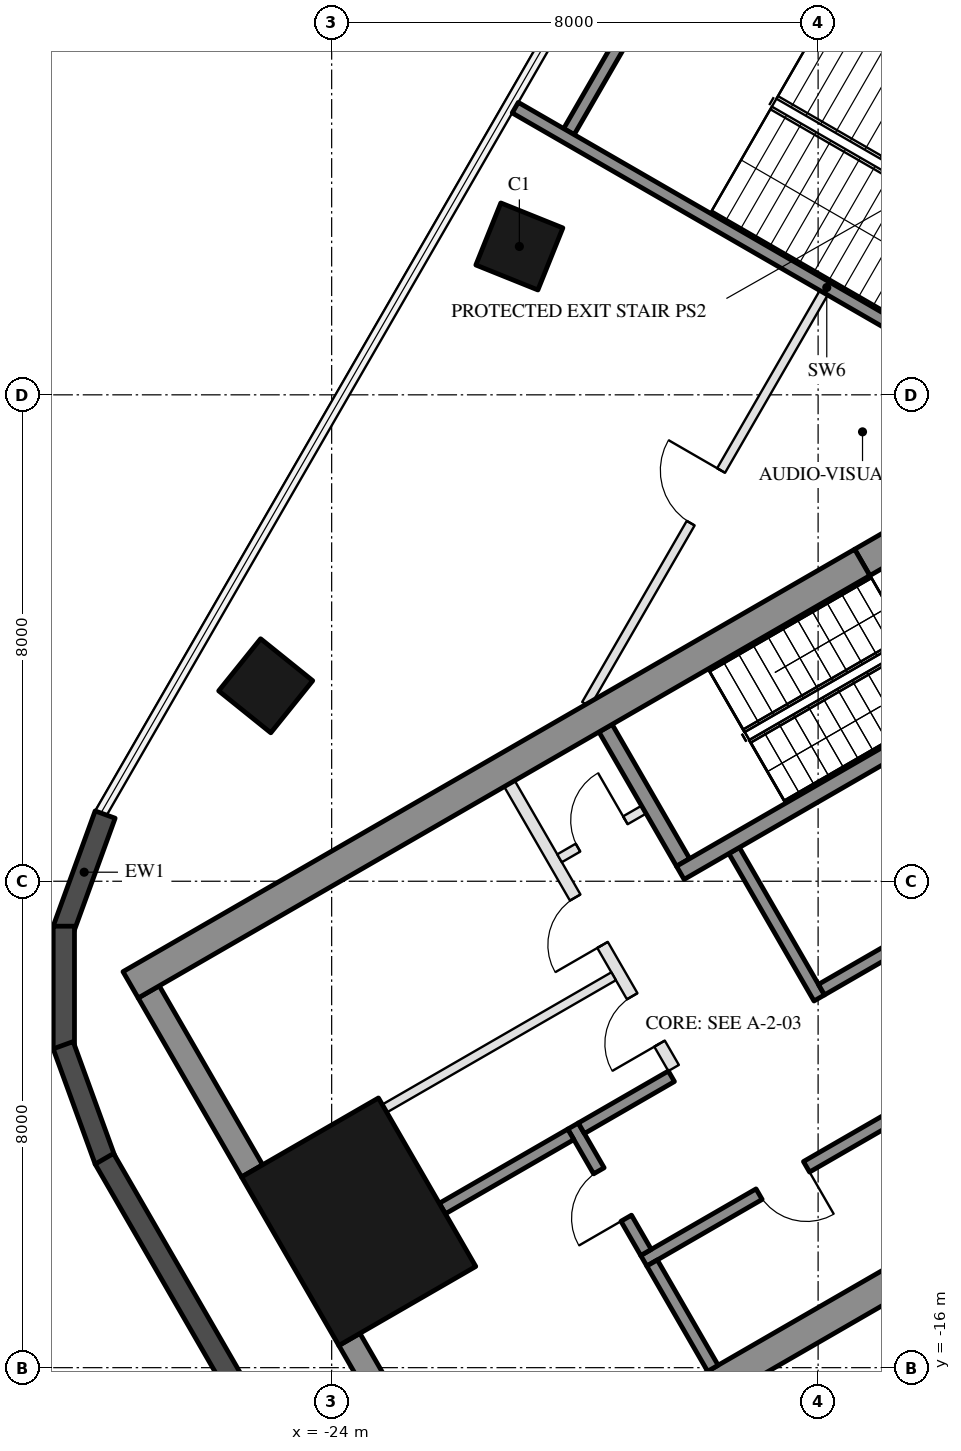
"""IFC4 building model, lengths in metres.
Left out: names, types, materials, properties, quantities, classifications, styles, units other than length and angle.
Written with IfcOpenShell. Run it as: python <this file> out.ifc"""

import sys

from ifc_helpers import new_model, si_unit, direction, frame, frame_2d, origin, origin_2d, place, context, subcontext, project, spatial, rectangle, hollow_rectangle, extrude, boolean, halfspace, element, fill, save


model = new_model("IFC4")
c1 = context("Model", 3, precision=1e-05, world=origin(), true_north=direction((0.0, 1.0)))
c2 = subcontext(c1, "Body", "Model", "MODEL_VIEW")
j1 = project(units=[si_unit("LENGTHUNIT", "METRE"), si_unit("PLANEANGLEUNIT", "RADIAN")], contexts=[c1])
p1 = place(None, origin())
s1 = spatial("IfcSite", under=j1, at=p1, CompositionType="ELEMENT")
p2 = place(p1, origin())
s2 = spatial("IfcBuilding", under=s1, at=p2, CompositionType="ELEMENT")
p3 = place(p2, frame((0.0, 0.0, 15.5)))
s3 = spatial("IfcBuildingStorey", under=s2, at=p3, CompositionType="ELEMENT", Elevation=15.5)
p4 = place(p3, frame((-20.913, 2.44, 0.0), z_axis=(0.087093940596, -0.012342108161, 0.996123645878), x_axis=(-0.498471453495, -0.866283513655, 0.032849414298)))
e1 = element("IfcColumn", 1, at=p4, inside=s3, PredefinedType="COLUMN", context=c2, shape_type="SweptSolid", body=[
    boolean("DIFFERENCE", boolean("DIFFERENCE", extrude(hollow_rectangle(XDim=1.1, YDim=1.1, WallThickness=0.05, at=origin_2d()), origin(), (0.0, 0.0, 1.0), 8.031), halfspace(frame((0.0, 0.0, 0.016), z_axis=(0.0, 0.0, 1.0), x_axis=(1.0, 0.0, 0.0)), True)), halfspace(frame((0.0, 0.0, 8.017), z_axis=(0.0, 0.0, 1.0), x_axis=(1.0, 0.0, 0.0)), False)),
])
p5 = place(p3, frame((-25.085, -4.785, 0.0), z_axis=(0.103342523087, 0.016055270107, 0.994516239799), x_axis=(-0.496544233253, -0.865531278417, 0.06557004274)))
e2 = element("IfcColumn", 2, at=p5, inside=s3, PredefinedType="COLUMN", context=c2, shape_type="SweptSolid", body=[
    boolean("DIFFERENCE", boolean("DIFFERENCE", extrude(hollow_rectangle(XDim=1.1, YDim=1.1, WallThickness=0.05, at=origin_2d()), origin(), (0.0, 0.0, 1.0), 8.044), halfspace(frame((0.0, 0.0, 0.018), z_axis=(0.0, 0.0, 1.0), x_axis=(1.0, 0.0, 0.0)), True)), halfspace(frame((0.0, 0.0, 8.027), z_axis=(0.0, 0.0, 1.0), x_axis=(1.0, 0.0, 0.0)), False)),
])
p6 = place(p3, frame((-23.556, -13.6, 0.0), z_axis=(0.0, 0.0, 1.0), x_axis=(-0.5, 0.866025403784, 0.0)))
e3 = element("IfcColumn", 3, at=p6, inside=s3, PredefinedType="COLUMN", context=c2, shape_type="SweptSolid", body=[
    extrude(hollow_rectangle(XDim=3.2, YDim=2.6, WallThickness=0.08, at=origin_2d()), origin(), (0.0, 0.0, 1.0), 8.0),
])
p7 = place(p3, frame((-27.725, -6.903, 0.0), z_axis=(0.0, 0.0, 1.0), x_axis=(-0.342102542586, -0.939662625816, 0.0)))
e4 = element("IfcWall", 4, at=p7, inside=s3, PredefinedType="SOLIDWALL", context=c2, shape_type="SweptSolid", body=[
    extrude(rectangle(XDim=2.018, YDim=0.35, at=frame_2d((1.009, 0.0))), origin(), (0.0, 0.0, 1.0), 7.7),
])
for number, where, z_axis, x_axis in (
    (5, (-28.405, -8.739, 0.0), (0.0, 0.0, 1.0), (0.0, -1.0, 0.0)),
    (6, (-28.415, -10.697, 0.0), (0.0, 0.0, 1.0), (0.342, -0.94, 0.0)),
):
    element("IfcWall", number, at=place(p3, frame(where, z_axis=z_axis, x_axis=x_axis)), inside=s3, PredefinedType="SOLIDWALL", context=c2, shape_type="SweptSolid", body=[
        extrude(rectangle(XDim=2.017, YDim=0.35, at=frame_2d((1.009, 0.0))), origin(), (0.0, 0.0, 1.0), 7.7),
    ])
p8 = place(p3, frame((-27.738, -12.565, 0.0), z_axis=(0.0, 0.0, 1.0), x_axis=(0.499984178349, -0.866034538226, 0.0)))
e7 = element("IfcWall", 7, at=p8, inside=s3, PredefinedType="SOLIDWALL", context=c2, shape_type="SweptSolid", body=[
    extrude(rectangle(XDim=5.975, YDim=0.35, at=frame_2d((2.988, 0.0))), origin(), (0.0, 0.0, 1.0), 7.7),
])
p9 = place(p3, frame((-8.547, -10.997, 0.0), z_axis=(0.0, 0.0, 1.0), x_axis=(-0.866024264262, -0.500001973705, 0.0)))
e8 = element("IfcWall", 8, at=p9, inside=s3, PredefinedType="SHEAR", context=c2, shape_type="SweptSolid", body=[
    extrude(rectangle(XDim=15.6, YDim=0.5, at=frame_2d((7.8, 0.0))), origin(), (0.0, 0.0, 1.0), 7.7),
])
p10 = place(p3, frame((-23.708, -15.536, 0.0), z_axis=(0.0, 0.0, 1.0), x_axis=(0.500008388397, -0.866020560687, 0.0)))
e9 = element("IfcWall", 9, at=p10, inside=s3, PredefinedType="SHEAR", context=c2, shape_type="SweptSolid", body=[
    extrude(rectangle(XDim=3.4, YDim=0.4, at=frame_2d((1.7, 0.0))), origin(), (0.0, 0.0, 1.0), 7.7),
])
p11 = place(p3, frame((-27.009, -9.82, 0.0), z_axis=(0.0, 0.0, 1.0), x_axis=(0.499977295307, -0.866038511948, 0.0)))
e10 = element("IfcWall", 10, at=p11, inside=s3, PredefinedType="SHEAR", context=c2, shape_type="SweptSolid", body=[
    extrude(rectangle(XDim=3.4, YDim=0.4, at=frame_2d((1.7, 0.0))), origin(), (0.0, 0.0, 1.0), 7.7),
])
p12 = place(p3, frame((-19.496, -5.482, 0.0), z_axis=(0.0, 0.0, 1.0), x_axis=(0.499990435942, -0.866030925526, 0.0)))
e11 = element("IfcWall", 11, at=p12, inside=s3, PredefinedType="SHEAR", context=c2, shape_type="SweptSolid", body=[
    extrude(rectangle(XDim=2.55, YDim=0.25, at=frame_2d((1.275, 0.0))), origin(), (0.0, 0.0, 1.0), 7.7),
])
p13 = place(p3, frame((-17.381, -7.495, 0.0), z_axis=(0.0, 0.0, 1.0), x_axis=(0.500011755427, -0.866018616679, 0.0)))
e12 = element("IfcWall", 12, at=p13, inside=s3, PredefinedType="SHEAR", context=c2, shape_type="SweptSolid", body=[
    extrude(rectangle(XDim=2.8, YDim=0.2, at=frame_2d((1.4, 0.0))), origin(), (0.0, 0.0, 1.0), 7.7),
])
p14 = place(p3, frame((-13.52, -8.383, 0.0), z_axis=(0.0, 0.0, 1.0), x_axis=(-0.866034573852, -0.49998411664, 0.0)))
e13 = element("IfcWall", 13, at=p14, inside=s3, PredefinedType="SHEAR", context=c2, shape_type="SweptSolid", body=[
    extrude(rectangle(XDim=2.8, YDim=0.2, at=frame_2d((1.4, 0.0))), origin(), (0.0, 0.0, 1.0), 7.7),
])
p15 = place(p3, frame((-10.068, -9.162, 0.0), z_axis=(0.0, 0.0, 1.0), x_axis=(-0.866032725843, -0.499987317609, 0.0)))
e14 = element("IfcWall", 14, at=p15, inside=s3, PredefinedType="SHEAR", context=c2, shape_type="SweptSolid", body=[
    extrude(rectangle(XDim=10.16, YDim=0.2, at=frame_2d((5.08, 0.0))), origin(), (0.0, 0.0, 1.0), 7.7),
])
p16 = place(p15, frame((1.99, 0.0, 0.0)))
e15 = element("IfcOpeningElement", 15, at=p16, cuts=e14, PredefinedType="OPENING", context=c2, shape_type="SweptSolid", body=[
    extrude(rectangle(XDim=0.9, YDim=2.1, at=frame_2d((0.45, 1.05))), frame((0.0, 0.11, 0.0), z_axis=(0.0, -1.0, 0.0), x_axis=(1.0, 0.0, 0.0)), (0.0, 0.0, 1.0), 0.22),
])
p17 = place(p15, frame((7.07, 0.0, 0.0)))
e16 = element("IfcOpeningElement", 16, at=p17, cuts=e14, PredefinedType="OPENING", context=c2, shape_type="SweptSolid", body=[
    extrude(rectangle(XDim=0.9, YDim=2.1, at=frame_2d((0.45, 1.05))), frame((0.0, 0.11, 0.0), z_axis=(0.0, -1.0, 0.0), x_axis=(1.0, 0.0, 0.0)), (0.0, 0.0, 1.0), 0.22),
])
p18 = place(p3, frame((-20.031, -12.026, 0.0), z_axis=(0.0, 0.0, 1.0), x_axis=(0.500033551112, -0.866006032174, 0.0)))
e17 = element("IfcWall", 17, at=p18, inside=s3, PredefinedType="SHEAR", context=c2, shape_type="SweptSolid", body=[
    extrude(rectangle(XDim=2.4, YDim=0.2, at=frame_2d((1.2, 0.0))), origin(), (0.0, 0.0, 1.0), 7.7),
])
p19 = place(p18, frame((0.85, 0.0, 0.0)))
e18 = element("IfcOpeningElement", 18, at=p19, cuts=e17, PredefinedType="OPENING", context=c2, shape_type="SweptSolid", body=[
    extrude(rectangle(XDim=0.9, YDim=2.1, at=frame_2d((0.45, 1.05))), frame((0.0, 0.11, 0.0), z_axis=(0.0, -1.0, 0.0), x_axis=(1.0, 0.0, 0.0)), (0.0, 0.0, 1.0), 0.22),
])
p20 = place(p3, frame((-18.413, -11.208, 0.0), z_axis=(0.0, 0.0, 1.0), x_axis=(-0.866038183914, -0.499977863513, 0.0)))
e19 = element("IfcWall", 19, at=p20, inside=s3, PredefinedType="SHEAR", context=c2, shape_type="SweptSolid", body=[
    extrude(rectangle(XDim=1.71, YDim=0.2, at=frame_2d((0.855, 0.0))), origin(), (0.0, 0.0, 1.0), 7.7),
])
p21 = place(p3, frame((-18.73, -14.278, 0.0), z_axis=(0.0, 0.0, 1.0), x_axis=(0.50002537861, -0.866010750942, 0.0)))
e20 = element("IfcWall", 20, at=p21, inside=s3, PredefinedType="SHEAR", context=c2, shape_type="SweptSolid", body=[
    extrude(rectangle(XDim=2.0, YDim=0.2, at=frame_2d((1.0, 0.0))), origin(), (0.0, 0.0, 1.0), 7.7),
])
p22 = place(p3, frame((-20.067, -12.163, 0.0), z_axis=(0.0, 0.0, 1.0), x_axis=(-0.866048967903, -0.499959183527, 0.0)))
e21 = element("IfcWall", 21, at=p22, inside=s3, PredefinedType="SHEAR", context=c2, shape_type="SweptSolid", body=[
    extrude(rectangle(XDim=2.44, YDim=0.2, at=frame_2d((1.22, 0.0))), origin(), (0.0, 0.0, 1.0), 7.7),
])
p23 = place(p3, frame((-21.076, -6.395, 0.0), z_axis=(0.0, 0.0, 1.0), x_axis=(0.50001468107, -0.866016927499, 0.0)))
e22 = element("IfcWall", 22, at=p23, inside=s3, PredefinedType="PARTITIONING", context=c2, shape_type="SweptSolid", body=[
    extrude(rectangle(XDim=5.4, YDim=0.2, at=frame_2d((2.7, 0.0))), origin(), (0.0, 0.0, 1.0), 7.7),
])
p24 = place(p23, frame((2.163, 0.0, 0.0)))
e23 = element("IfcOpeningElement", 23, at=p24, cuts=e22, PredefinedType="OPENING", context=c2, shape_type="SweptSolid", body=[
    extrude(rectangle(XDim=0.9, YDim=2.1, at=frame_2d((0.45, 1.05))), frame((0.0, 0.11, 0.0), z_axis=(0.0, -1.0, 0.0), x_axis=(1.0, 0.0, 0.0)), (0.0, 0.0, 1.0), 0.22),
])
p25 = place(p23, frame((4.038, 0.0, 0.0)))
e24 = element("IfcOpeningElement", 24, at=p25, cuts=e22, PredefinedType="OPENING", context=c2, shape_type="SweptSolid", body=[
    extrude(rectangle(XDim=0.9, YDim=2.1, at=frame_2d((0.45, 1.05))), frame((0.0, 0.11, 0.0), z_axis=(0.0, -1.0, 0.0), x_axis=(1.0, 0.0, 0.0)), (0.0, 0.0, 1.0), 0.22),
])
p26 = place(p3, frame((-18.866, -6.822, 0.0), z_axis=(0.0, 0.0, 1.0), x_axis=(-0.866028054938, -0.499995408039, 0.0)))
e25 = element("IfcWall", 25, at=p26, inside=s3, PredefinedType="PARTITIONING", context=c2, shape_type="SweptSolid", body=[
    extrude(rectangle(XDim=1.6, YDim=0.15, at=frame_2d((0.8, 0.0))), origin(), (0.0, 0.0, 1.0), 7.7),
])
p27 = place(p26, frame((0.35, 0.0, 0.0)))
e26 = element("IfcOpeningElement", 26, at=p27, cuts=e25, PredefinedType="OPENING", context=c2, shape_type="SweptSolid", body=[
    extrude(rectangle(XDim=0.9, YDim=2.1, at=frame_2d((0.45, 1.05))), frame((0.0, 0.085, 0.0), z_axis=(0.0, -1.0, 0.0), x_axis=(1.0, 0.0, 0.0)), (0.0, 0.0, 1.0), 0.17),
])
p28 = place(p3, frame((-19.363, -9.562, 0.0), z_axis=(0.0, 0.0, 1.0), x_axis=(-0.866027639635, -0.499996127374, 0.0)))
e27 = element("IfcWall", 27, at=p28, inside=s3, PredefinedType="PARTITIONING", context=c2, shape_type="SweptSolid", body=[
    extrude(rectangle(XDim=4.35, YDim=0.15, at=frame_2d((2.175, 0.0))), origin(), (0.0, 0.0, 1.0), 7.7),
])
p29 = place(p3, frame((-13.797, -1.903, 0.0), z_axis=(0.0, 0.0, 1.0), x_axis=(-0.866033076574, -0.499986710104, 0.0)))
e28 = element("IfcWall", 28, at=p29, inside=s3, PredefinedType="SHEAR", context=c2, shape_type="SweptSolid", body=[
    extrude(rectangle(XDim=1.706, YDim=0.5, at=frame_2d((0.853, 0.0))), origin(), (0.0, 0.0, 1.0), 7.7),
])
p30 = place(p3, frame((-15.274, -2.756, 0.0), z_axis=(0.0, 0.0, 1.0), x_axis=(-0.86602318214, -0.500003847982, 0.0)))
e29 = element("IfcWall", 29, at=p30, inside=s3, PredefinedType="SHEAR", context=c2, shape_type="SweptSolid", body=[
    extrude(rectangle(XDim=13.894, YDim=0.5, at=frame_2d((6.947, 0.0))), origin(), (0.0, 0.0, 1.0), 7.7),
])
p31 = place(p3, frame((-13.812, -5.29, 0.0), z_axis=(0.0, 0.0, 1.0), x_axis=(-0.866023561601, -0.500003190742, 0.0)))
e30 = element("IfcWall", 30, at=p31, inside=s3, PredefinedType="SHEAR", context=c2, shape_type="SweptSolid", body=[
    extrude(rectangle(XDim=5.144, YDim=0.25, at=frame_2d((2.572, 0.0))), origin(), (0.0, 0.0, 1.0), 7.7),
])
p32 = place(p3, frame((-17.948, 8.053, 0.0), z_axis=(0.0, 0.0, 1.0), x_axis=(-0.500028799954, -0.866008775485, 0.0)))
e31 = element("IfcWall", 31, at=p32, inside=s3, PredefinedType="SOLIDWALL", context=c2, shape_type="SweptSolid", body=[
    extrude(rectangle(XDim=4.3, YDim=0.2, at=frame_2d((2.15, 0.0))), origin(), (0.0, 0.0, 1.0), 7.7),
])
p33 = place(p3, frame((-15.908, 1.679, 0.0), z_axis=(0.0, 0.0, 1.0), x_axis=(-0.49997934671, -0.866037327638, 0.0)))
e32 = element("IfcWall", 32, at=p33, inside=s3, PredefinedType="PARTITIONING", context=c2, shape_type="SweptSolid", body=[
    extrude(rectangle(XDim=7.815, YDim=0.15, at=frame_2d((3.908, 0.0))), origin(), (0.0, 0.0, 1.0), 6.91),
])
p34 = place(p33, frame((3.375, 0.0, 0.0)))
e33 = element("IfcOpeningElement", 33, at=p34, cuts=e32, PredefinedType="OPENING", context=c2, shape_type="SweptSolid", body=[
    extrude(rectangle(XDim=1.0, YDim=2.1, at=frame_2d((0.5, 1.05))), frame((0.0, 0.085, 0.0), z_axis=(0.0, -1.0, 0.0), x_axis=(1.0, 0.0, 0.0)), (0.0, 0.0, 1.0), 0.17),
])
p35 = place(p3, frame((-17.948, 8.053, 0.0), z_axis=(0.0, 0.0, 1.0), x_axis=(0.86602026553, -0.500008899612, 0.0)))
e34 = element("IfcWall", 34, at=p35, inside=s3, PredefinedType="SOLIDWALL", context=c2, shape_type="SweptSolid", body=[
    extrude(rectangle(XDim=10.87, YDim=0.2, at=frame_2d((5.435, 0.0))), origin(), (0.0, 0.0, 1.0), 7.7),
])
p36 = place(p3, frame((-20.981, 4.723, 0.0), z_axis=(0.0, 0.0, 1.0), x_axis=(0.866023736906, -0.500002887107, 0.0)))
e35 = element("IfcWall", 35, at=p36, inside=s3, PredefinedType="SOLIDWALL", context=c2, shape_type="SweptSolid", body=[
    extrude(rectangle(XDim=11.832, YDim=0.2, at=frame_2d((5.916, 0.0))), origin(), (0.0, 0.0, 1.0), 7.7),
])
p37 = place(p27, frame((0.9, 0.0, 0.0), z_axis=(0.0, 0.0, 1.0), x_axis=(-1.0, 0.0, 0.0)))
e36 = element("IfcDoor", 36, at=p37, inside=s3, OperationType="SINGLE_SWING_RIGHT", PredefinedType="DOOR", context=c2, shape_type="SweptSolid", body=[
    extrude(rectangle(XDim=0.9, YDim=2.1, at=frame_2d((0.45, 1.05))), frame((0.0, 0.025, 0.0), z_axis=(0.0, -1.0, 0.0), x_axis=(1.0, 0.0, 0.0)), (0.0, 0.0, 1.0), 0.05),
])
fill(e26, e36)
p38 = place(p17, origin())
e37 = element("IfcDoor", 37, at=p38, inside=s3, OperationType="SINGLE_SWING_LEFT", PredefinedType="DOOR", context=c2, shape_type="SweptSolid", body=[
    extrude(rectangle(XDim=0.9, YDim=2.1, at=frame_2d((0.45, 1.05))), frame((0.0, 0.025, 0.0), z_axis=(0.0, -1.0, 0.0), x_axis=(1.0, 0.0, 0.0)), (0.0, 0.0, 1.0), 0.05),
])
fill(e16, e37)
p39 = place(p19, frame((0.9, 0.0, 0.0), z_axis=(0.0, 0.0, 1.0), x_axis=(-1.0, 0.0, 0.0)))
e38 = element("IfcDoor", 38, at=p39, inside=s3, OperationType="SINGLE_SWING_LEFT", PredefinedType="DOOR", context=c2, shape_type="SweptSolid", body=[
    extrude(rectangle(XDim=0.9, YDim=2.1, at=frame_2d((0.45, 1.05))), frame((0.0, 0.025, 0.0), z_axis=(0.0, -1.0, 0.0), x_axis=(1.0, 0.0, 0.0)), (0.0, 0.0, 1.0), 0.05),
])
fill(e18, e38)
p40 = place(p24, frame((0.9, 0.0, 0.0), z_axis=(0.0, 0.0, 1.0), x_axis=(-1.0, 0.0, 0.0)))
e39 = element("IfcDoor", 39, at=p40, inside=s3, OperationType="SINGLE_SWING_LEFT", PredefinedType="DOOR", context=c2, shape_type="SweptSolid", body=[
    extrude(rectangle(XDim=0.9, YDim=2.1, at=frame_2d((0.45, 1.05))), frame((0.0, 0.025, 0.0), z_axis=(0.0, -1.0, 0.0), x_axis=(1.0, 0.0, 0.0)), (0.0, 0.0, 1.0), 0.05),
])
fill(e23, e39)
p41 = place(p25, frame((0.9, 0.0, 0.0), z_axis=(0.0, 0.0, 1.0), x_axis=(-1.0, 0.0, 0.0)))
e40 = element("IfcDoor", 40, at=p41, inside=s3, OperationType="SINGLE_SWING_LEFT", PredefinedType="DOOR", context=c2, shape_type="SweptSolid", body=[
    extrude(rectangle(XDim=0.9, YDim=2.1, at=frame_2d((0.45, 1.05))), frame((0.0, 0.025, 0.0), z_axis=(0.0, -1.0, 0.0), x_axis=(1.0, 0.0, 0.0)), (0.0, 0.0, 1.0), 0.05),
])
fill(e24, e40)
p42 = place(p34, frame((1.0, 0.0, 0.0), z_axis=(0.0, 0.0, 1.0), x_axis=(-1.0, 0.0, 0.0)))
e41 = element("IfcDoor", 41, at=p42, inside=s3, OperationType="SINGLE_SWING_RIGHT", PredefinedType="DOOR", context=c2, shape_type="SweptSolid", body=[
    extrude(rectangle(XDim=1.0, YDim=2.1, at=frame_2d((0.5, 1.05))), frame((0.0, 0.025, 0.0), z_axis=(0.0, -1.0, 0.0), x_axis=(1.0, 0.0, 0.0)), (0.0, 0.0, 1.0), 0.05),
])
fill(e33, e41)
save(model, sys.argv[1])
